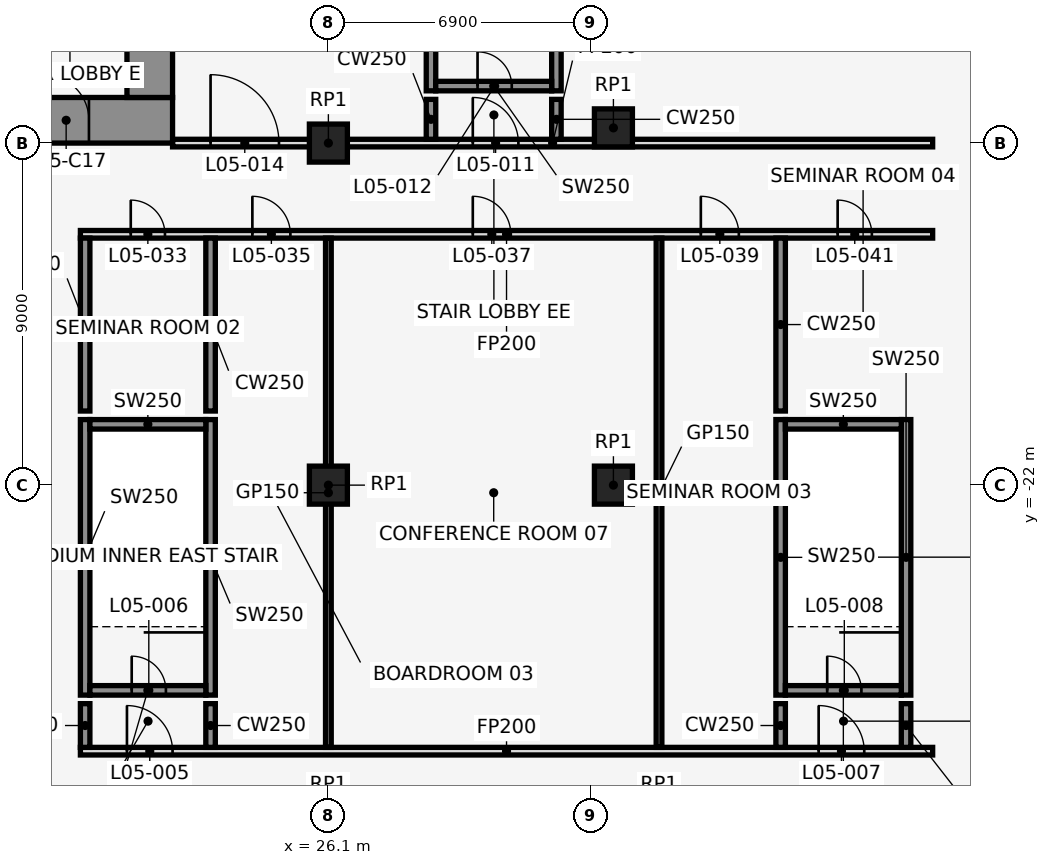
"""IFC4 building model, lengths in metres.
Left out: names, types, materials, properties, quantities, classifications, styles, units other than length and angle.
Written with IfcOpenShell. Run it as: python <this file> out.ifc"""

import sys

from ifc_helpers import new_model, si_unit, direction, frame, frame_2d, origin, origin_2d, place, context, subcontext, project, spatial, rectangle, extrude, element, fill, save


model = new_model("IFC4")
c1 = context("Model", 3, precision=1e-05, world=origin(), true_north=direction((0.0, 1.0)))
c2 = subcontext(c1, "Body", "Model", "MODEL_VIEW")
j1 = project(units=[si_unit("LENGTHUNIT", "METRE"), si_unit("PLANEANGLEUNIT", "RADIAN")], contexts=[c1])
p1 = place(None, origin())
s1 = spatial("IfcSite", under=j1, at=p1, CompositionType="ELEMENT")
p2 = place(p1, origin())
s2 = spatial("IfcBuilding", under=s1, at=p2, CompositionType="ELEMENT")
p3 = place(p2, frame((0.0, 0.0, 30.0)))
s3 = spatial("IfcBuildingStorey", under=s2, at=p3, CompositionType="ELEMENT", Elevation=30.0)
for number, where, z_axis, x_axis in (
    (1, (33.6, -12.6, 0.0), (0.0, 0.0, 1.0), (1.0, 0.0, 0.0)),
    (2, (33.6, -22.0, 0.0), (0.0, 0.0, 1.0), (1.0, 0.0, 0.0)),
    (3, (26.1, -22.0, 0.0), (0.0, 0.0, 1.0), (1.0, 0.0, 0.0)),
    (4, (26.1, -13.0, 0.0), (0.0, 0.0, 1.0), (1.0, 0.0, 0.0)),
):
    element("IfcColumn", number, at=place(p3, frame(where, z_axis=z_axis, x_axis=x_axis)), inside=s3, PredefinedType="COLUMN", context=c2, shape_type="SweptSolid", body=[
        extrude(rectangle(XDim=1.0, YDim=1.0, at=origin_2d()), origin(), (0.0, 0.0, 1.0), 5.0),
    ])
for number, where, z_axis, x_axis in (
    (5, (28.8, -11.625, 0.0), (0.0, 0.0, 1.0), (0.0, 1.0, 0.0)),
    (6, (32.1, -11.625, 0.0), (0.0, 0.0, 1.0), (0.0, 1.0, 0.0)),
):
    element("IfcWall", number, at=place(p3, frame(where, z_axis=z_axis, x_axis=x_axis)), inside=s3, PredefinedType="SHEAR", context=c2, shape_type="SweptSolid", body=[
        extrude(rectangle(XDim=7.25, YDim=0.25, at=frame_2d((3.625, 0.0))), origin(), (0.0, 0.0, 1.0), 5.0),
    ])
p4 = place(p3, frame((28.925, -11.5, 0.0), z_axis=(0.0, 0.0, 1.0), x_axis=(1.0, 0.0, 0.0)))
e7 = element("IfcWall", 7, at=p4, inside=s3, PredefinedType="SHEAR", context=c2, shape_type="SweptSolid", body=[
    extrude(rectangle(XDim=3.05, YDim=0.25, at=frame_2d((1.525, 0.0))), origin(), (0.0, 0.0, 1.0), 5.0),
])
p5 = place(p4, frame((1.1, 0.0, 0.0)))
e8 = element("IfcOpeningElement", 8, at=p5, cuts=e7, PredefinedType="OPENING", context=c2, shape_type="SweptSolid", body=[
    extrude(rectangle(XDim=0.9, YDim=2.1, at=frame_2d((0.45, 1.05))), frame((0.0, 0.137, 0.0), z_axis=(0.0, -1.0, 0.0), x_axis=(1.0, 0.0, 0.0)), (0.0, 0.0, 1.0), 0.274),
])
for number, where, z_axis, x_axis in (
    (9, (19.7, -27.525, 0.0), (0.0, 0.0, 1.0), (0.0, 1.0, 0.0)),
    (10, (23.0, -27.525, 0.0), (0.0, 0.0, 1.0), (0.0, 1.0, 0.0)),
):
    element("IfcWall", number, at=place(p3, frame(where, z_axis=z_axis, x_axis=x_axis)), inside=s3, PredefinedType="SHEAR", context=c2, shape_type="SweptSolid", body=[
        extrude(rectangle(XDim=7.25, YDim=0.25, at=frame_2d((3.625, 0.0))), origin(), (0.0, 0.0, 1.0), 5.0),
    ])
p6 = place(p3, frame((19.825, -27.4, 0.0), z_axis=(0.0, 0.0, 1.0), x_axis=(1.0, 0.0, 0.0)))
e11 = element("IfcWall", 11, at=p6, inside=s3, PredefinedType="SHEAR", context=c2, shape_type="SweptSolid", body=[
    extrude(rectangle(XDim=3.05, YDim=0.25, at=frame_2d((1.525, 0.0))), origin(), (0.0, 0.0, 1.0), 5.0),
])
p7 = place(p6, frame((1.1, 0.0, 0.0)))
e12 = element("IfcOpeningElement", 12, at=p7, cuts=e11, PredefinedType="OPENING", context=c2, shape_type="SweptSolid", body=[
    extrude(rectangle(XDim=0.9, YDim=2.1, at=frame_2d((0.45, 1.05))), frame((0.0, 0.137, 0.0), z_axis=(0.0, -1.0, 0.0), x_axis=(1.0, 0.0, 0.0)), (0.0, 0.0, 1.0), 0.274),
])
p8 = place(p3, frame((19.825, -20.4, 0.0), z_axis=(0.0, 0.0, 1.0), x_axis=(1.0, 0.0, 0.0)))
e13 = element("IfcWall", 13, at=p8, inside=s3, PredefinedType="SHEAR", context=c2, shape_type="SweptSolid", body=[
    extrude(rectangle(XDim=3.05, YDim=0.25, at=frame_2d((1.525, 0.0))), origin(), (0.0, 0.0, 1.0), 5.0),
])
for number, where, z_axis, x_axis in (
    (14, (38.0, -27.525, 0.0), (0.0, 0.0, 1.0), (0.0, 1.0, 0.0)),
    (15, (41.3, -27.525, 0.0), (0.0, 0.0, 1.0), (0.0, 1.0, 0.0)),
):
    element("IfcWall", number, at=place(p3, frame(where, z_axis=z_axis, x_axis=x_axis)), inside=s3, PredefinedType="SHEAR", context=c2, shape_type="SweptSolid", body=[
        extrude(rectangle(XDim=7.25, YDim=0.25, at=frame_2d((3.625, 0.0))), origin(), (0.0, 0.0, 1.0), 5.0),
    ])
p9 = place(p3, frame((38.125, -27.4, 0.0), z_axis=(0.0, 0.0, 1.0), x_axis=(1.0, 0.0, 0.0)))
e16 = element("IfcWall", 16, at=p9, inside=s3, PredefinedType="SHEAR", context=c2, shape_type="SweptSolid", body=[
    extrude(rectangle(XDim=3.05, YDim=0.25, at=frame_2d((1.525, 0.0))), origin(), (0.0, 0.0, 1.0), 5.0),
])
p10 = place(p9, frame((1.1, 0.0, 0.0)))
e17 = element("IfcOpeningElement", 17, at=p10, cuts=e16, PredefinedType="OPENING", context=c2, shape_type="SweptSolid", body=[
    extrude(rectangle(XDim=0.9, YDim=2.1, at=frame_2d((0.45, 1.05))), frame((0.0, 0.137, 0.0), z_axis=(0.0, -1.0, 0.0), x_axis=(1.0, 0.0, 0.0)), (0.0, 0.0, 1.0), 0.274),
])
p11 = place(p3, frame((38.125, -20.4, 0.0), z_axis=(0.0, 0.0, 1.0), x_axis=(1.0, 0.0, 0.0)))
e18 = element("IfcWall", 18, at=p11, inside=s3, PredefinedType="SHEAR", context=c2, shape_type="SweptSolid", body=[
    extrude(rectangle(XDim=3.05, YDim=0.25, at=frame_2d((1.525, 0.0))), origin(), (0.0, 0.0, 1.0), 5.0),
])
p12 = place(p3, frame((19.575, -29.0, 0.0), z_axis=(0.0, 0.0, 1.0), x_axis=(1.0, 0.0, 0.0)))
e19 = element("IfcWall", 19, at=p12, inside=s3, PredefinedType="PARTITIONING", context=c2, shape_type="SweptSolid", body=[
    extrude(rectangle(XDim=22.425, YDim=0.2, at=frame_2d((11.212, 0.0))), origin(), (0.0, 0.0, 1.0), 3.74),
])
p13 = place(p12, frame((1.225, 0.0, 0.0)))
e20 = element("IfcOpeningElement", 20, at=p13, cuts=e19, PredefinedType="OPENING", context=c2, shape_type="SweptSolid", body=[
    extrude(rectangle(XDim=1.2, YDim=2.1, at=frame_2d((0.6, 1.05))), frame((0.0, 0.112, 0.0), z_axis=(0.0, -1.0, 0.0), x_axis=(1.0, 0.0, 0.0)), (0.0, 0.0, 1.0), 0.224),
])
p14 = place(p12, frame((19.425, 0.0, 0.0)))
e21 = element("IfcOpeningElement", 21, at=p14, cuts=e19, PredefinedType="OPENING", context=c2, shape_type="SweptSolid", body=[
    extrude(rectangle(XDim=1.2, YDim=2.1, at=frame_2d((0.6, 1.05))), frame((0.0, 0.112, 0.0), z_axis=(0.0, -1.0, 0.0), x_axis=(1.0, 0.0, 0.0)), (0.0, 0.0, 1.0), 0.224),
])
p15 = place(p3, frame((19.575, -15.4, 0.0), z_axis=(0.0, 0.0, 1.0), x_axis=(1.0, 0.0, 0.0)))
e22 = element("IfcWall", 22, at=p15, inside=s3, PredefinedType="PARTITIONING", context=c2, shape_type="SweptSolid", body=[
    extrude(rectangle(XDim=22.425, YDim=0.2, at=frame_2d((11.212, 0.0))), origin(), (0.0, 0.0, 1.0), 3.74),
])
p16 = place(p15, frame((1.325, 0.0, 0.0)))
e23 = element("IfcOpeningElement", 23, at=p16, cuts=e22, PredefinedType="OPENING", context=c2, shape_type="SweptSolid", body=[
    extrude(rectangle(XDim=0.9, YDim=2.1, at=frame_2d((0.45, 1.05))), frame((0.0, 0.112, 0.0), z_axis=(0.0, -1.0, 0.0), x_axis=(1.0, 0.0, 0.0)), (0.0, 0.0, 1.0), 0.224),
])
p17 = place(p15, frame((4.525, 0.0, 0.0)))
e24 = element("IfcOpeningElement", 24, at=p17, cuts=e22, PredefinedType="OPENING", context=c2, shape_type="SweptSolid", body=[
    extrude(rectangle(XDim=1.0, YDim=2.1, at=frame_2d((0.5, 1.05))), frame((0.0, 0.112, 0.0), z_axis=(0.0, -1.0, 0.0), x_axis=(1.0, 0.0, 0.0)), (0.0, 0.0, 1.0), 0.224),
])
p18 = place(p15, frame((10.325, 0.0, 0.0)))
e25 = element("IfcOpeningElement", 25, at=p18, cuts=e22, PredefinedType="OPENING", context=c2, shape_type="SweptSolid", body=[
    extrude(rectangle(XDim=1.0, YDim=2.1, at=frame_2d((0.5, 1.05))), frame((0.0, 0.112, 0.0), z_axis=(0.0, -1.0, 0.0), x_axis=(1.0, 0.0, 0.0)), (0.0, 0.0, 1.0), 0.224),
])
p19 = place(p15, frame((16.325, 0.0, 0.0)))
e26 = element("IfcOpeningElement", 26, at=p19, cuts=e22, PredefinedType="OPENING", context=c2, shape_type="SweptSolid", body=[
    extrude(rectangle(XDim=1.0, YDim=2.1, at=frame_2d((0.5, 1.05))), frame((0.0, 0.112, 0.0), z_axis=(0.0, -1.0, 0.0), x_axis=(1.0, 0.0, 0.0)), (0.0, 0.0, 1.0), 0.224),
])
p20 = place(p15, frame((19.925, 0.0, 0.0)))
e27 = element("IfcOpeningElement", 27, at=p20, cuts=e22, PredefinedType="OPENING", context=c2, shape_type="SweptSolid", body=[
    extrude(rectangle(XDim=0.9, YDim=2.1, at=frame_2d((0.45, 1.05))), frame((0.0, 0.112, 0.0), z_axis=(0.0, -1.0, 0.0), x_axis=(1.0, 0.0, 0.0)), (0.0, 0.0, 1.0), 0.224),
])
p21 = place(p3, frame((22.0, -13.0, 0.0), z_axis=(0.0, 0.0, 1.0), x_axis=(1.0, 0.0, 0.0)))
e28 = element("IfcWall", 28, at=p21, inside=s3, PredefinedType="PARTITIONING", context=c2, shape_type="SweptSolid", body=[
    extrude(rectangle(XDim=20.0, YDim=0.2, at=frame_2d((10.0, 0.0))), origin(), (0.0, 0.0, 1.0), 3.74),
])
p22 = place(p21, frame((7.9, 0.0, 0.0)))
e29 = element("IfcOpeningElement", 29, at=p22, cuts=e28, PredefinedType="OPENING", context=c2, shape_type="SweptSolid", body=[
    extrude(rectangle(XDim=1.2, YDim=2.1, at=frame_2d((0.6, 1.05))), frame((0.0, 0.112, 0.0), z_axis=(0.0, -1.0, 0.0), x_axis=(1.0, 0.0, 0.0)), (0.0, 0.0, 1.0), 0.224),
])
p23 = place(p21, frame((1.0, 0.0, 0.0)))
e30 = element("IfcOpeningElement", 30, at=p23, cuts=e28, PredefinedType="OPENING", context=c2, shape_type="SweptSolid", body=[
    extrude(rectangle(XDim=1.8, YDim=2.1, at=frame_2d((0.9, 1.05))), frame((0.0, 0.112, 0.0), z_axis=(0.0, -1.0, 0.0), x_axis=(1.0, 0.0, 0.0)), (0.0, 0.0, 1.0), 0.224),
])
p24 = place(p3, frame((19.7, -28.9, 0.0), z_axis=(0.0, 0.0, 1.0), x_axis=(0.0, 1.0, 0.0)))
e31 = element("IfcWall", 31, at=p24, inside=s3, PredefinedType="SHEAR", context=c2, shape_type="SweptSolid", body=[
    extrude(rectangle(XDim=1.15, YDim=0.25, at=frame_2d((0.575, 0.0))), origin(), (0.0, 0.0, 1.0), 5.0),
])
p25 = place(p3, frame((19.7, -20.05, 0.0), z_axis=(0.0, 0.0, 1.0), x_axis=(0.0, 1.0, 0.0)))
e32 = element("IfcWall", 32, at=p25, inside=s3, PredefinedType="SHEAR", context=c2, shape_type="SweptSolid", body=[
    extrude(rectangle(XDim=4.55, YDim=0.25, at=frame_2d((2.275, 0.0))), origin(), (0.0, 0.0, 1.0), 5.0),
])
p26 = place(p3, frame((23.0, -28.9, 0.0), z_axis=(0.0, 0.0, 1.0), x_axis=(0.0, 1.0, 0.0)))
e33 = element("IfcWall", 33, at=p26, inside=s3, PredefinedType="SHEAR", context=c2, shape_type="SweptSolid", body=[
    extrude(rectangle(XDim=1.15, YDim=0.25, at=frame_2d((0.575, 0.0))), origin(), (0.0, 0.0, 1.0), 5.0),
])
p27 = place(p3, frame((23.0, -20.05, 0.0), z_axis=(0.0, 0.0, 1.0), x_axis=(0.0, 1.0, 0.0)))
e34 = element("IfcWall", 34, at=p27, inside=s3, PredefinedType="SHEAR", context=c2, shape_type="SweptSolid", body=[
    extrude(rectangle(XDim=4.55, YDim=0.25, at=frame_2d((2.275, 0.0))), origin(), (0.0, 0.0, 1.0), 5.0),
])
p28 = place(p3, frame((26.1, -28.9, 0.0), z_axis=(0.0, 0.0, 1.0), x_axis=(0.0, 1.0, 0.0)))
e35 = element("IfcWall", 35, at=p28, inside=s3, PredefinedType="PARTITIONING", context=c2, shape_type="SweptSolid", body=[
    extrude(rectangle(XDim=13.4, YDim=0.15, at=frame_2d((6.7, 0.0))), origin(), (0.0, 0.0, 1.0), 3.74),
])
for number, where, z_axis, x_axis in (
    (36, (28.8, -12.9, 0.0), (0.0, 0.0, 1.0), (0.0, 1.0, 0.0)),
    (37, (32.1, -12.9, 0.0), (0.0, 0.0, 1.0), (0.0, 1.0, 0.0)),
):
    element("IfcWall", number, at=place(p3, frame(where, z_axis=z_axis, x_axis=x_axis)), inside=s3, PredefinedType="SHEAR", context=c2, shape_type="SweptSolid", body=[
        extrude(rectangle(XDim=1.05, YDim=0.25, at=frame_2d((0.525, 0.0))), origin(), (0.0, 0.0, 1.0), 5.0),
    ])
p29 = place(p3, frame((34.8, -28.9, 0.0), z_axis=(0.0, 0.0, 1.0), x_axis=(0.0, 1.0, 0.0)))
e38 = element("IfcWall", 38, at=p29, inside=s3, PredefinedType="PARTITIONING", context=c2, shape_type="SweptSolid", body=[
    extrude(rectangle(XDim=13.4, YDim=0.15, at=frame_2d((6.7, 0.0))), origin(), (0.0, 0.0, 1.0), 3.74),
])
p30 = place(p3, frame((38.0, -28.9, 0.0), z_axis=(0.0, 0.0, 1.0), x_axis=(0.0, 1.0, 0.0)))
e39 = element("IfcWall", 39, at=p30, inside=s3, PredefinedType="SHEAR", context=c2, shape_type="SweptSolid", body=[
    extrude(rectangle(XDim=1.15, YDim=0.25, at=frame_2d((0.575, 0.0))), origin(), (0.0, 0.0, 1.0), 5.0),
])
p31 = place(p3, frame((38.0, -20.05, 0.0), z_axis=(0.0, 0.0, 1.0), x_axis=(0.0, 1.0, 0.0)))
e40 = element("IfcWall", 40, at=p31, inside=s3, PredefinedType="SHEAR", context=c2, shape_type="SweptSolid", body=[
    extrude(rectangle(XDim=4.55, YDim=0.25, at=frame_2d((2.275, 0.0))), origin(), (0.0, 0.0, 1.0), 5.0),
])
p32 = place(p3, frame((41.3, -28.9, 0.0), z_axis=(0.0, 0.0, 1.0), x_axis=(0.0, 1.0, 0.0)))
e41 = element("IfcWall", 41, at=p32, inside=s3, PredefinedType="SHEAR", context=c2, shape_type="SweptSolid", body=[
    extrude(rectangle(XDim=1.15, YDim=0.25, at=frame_2d((0.575, 0.0))), origin(), (0.0, 0.0, 1.0), 5.0),
])
p33 = place(p3, frame((-22.0, -12.4, 0.0), z_axis=(0.0, 0.0, 1.0), x_axis=(1.0, 0.0, 0.0)))
e42 = element("IfcWall", 42, at=p33, inside=s3, PredefinedType="SHEAR", context=c2, shape_type="SweptSolid", body=[
    extrude(rectangle(XDim=44.0, YDim=1.2, at=frame_2d((22.0, 0.0))), origin(), (0.0, 0.0, 1.0), 5.0),
])
p34 = place(p33, frame((2.2, 0.0, 0.0)))
e43 = element("IfcOpeningElement", 43, at=p34, cuts=e42, PredefinedType="OPENING", context=c2, shape_type="SweptSolid", body=[
    extrude(rectangle(XDim=1.2, YDim=2.1, at=frame_2d((0.6, 1.05))), frame((0.0, 0.612, 0.0), z_axis=(0.0, -1.0, 0.0), x_axis=(1.0, 0.0, 0.0)), (0.0, 0.0, 1.0), 1.224),
])
p35 = place(p33, frame((21.4, 0.0, 0.0)))
e44 = element("IfcOpeningElement", 44, at=p35, cuts=e42, PredefinedType="OPENING", context=c2, shape_type="SweptSolid", body=[
    extrude(rectangle(XDim=1.2, YDim=2.1, at=frame_2d((0.6, 1.05))), frame((0.0, 0.612, 0.0), z_axis=(0.0, -1.0, 0.0), x_axis=(1.0, 0.0, 0.0)), (0.0, 0.0, 1.0), 1.224),
])
p36 = place(p33, frame((40.6, 0.0, 0.0)))
e45 = element("IfcOpeningElement", 45, at=p36, cuts=e42, PredefinedType="OPENING", context=c2, shape_type="SweptSolid", body=[
    extrude(rectangle(XDim=1.2, YDim=2.1, at=frame_2d((0.6, 1.05))), frame((0.0, 0.612, 0.0), z_axis=(0.0, -1.0, 0.0), x_axis=(1.0, 0.0, 0.0)), (0.0, 0.0, 1.0), 1.224),
])
p37 = place(p33, frame((16.0, 0.0, 0.0)))
e46 = element("IfcOpeningElement", 46, at=p37, cuts=e42, PredefinedType="OPENING", context=c2, shape_type="SweptSolid", body=[
    extrude(rectangle(XDim=1.8, YDim=2.1, at=frame_2d((0.9, 1.05))), frame((0.0, 0.612, 0.0), z_axis=(0.0, -1.0, 0.0), x_axis=(1.0, 0.0, 0.0)), (0.0, 0.0, 1.0), 1.224),
])
p38 = place(p33, frame((6.3, 0.0, 0.0)))
e47 = element("IfcOpeningElement", 47, at=p38, cuts=e42, PredefinedType="OPENING", context=c2, shape_type="SweptSolid", body=[
    extrude(rectangle(XDim=1.2, YDim=2.1, at=frame_2d((0.6, 1.05))), frame((0.0, 0.612, 0.0), z_axis=(0.0, -1.0, 0.0), x_axis=(1.0, 0.0, 0.0)), (0.0, 0.0, 1.0), 1.224),
])
p39 = place(p33, frame((26.2, 0.0, 0.0)))
e48 = element("IfcOpeningElement", 48, at=p39, cuts=e42, PredefinedType="OPENING", context=c2, shape_type="SweptSolid", body=[
    extrude(rectangle(XDim=1.8, YDim=2.1, at=frame_2d((0.9, 1.05))), frame((0.0, 0.612, 0.0), z_axis=(0.0, -1.0, 0.0), x_axis=(1.0, 0.0, 0.0)), (0.0, 0.0, 1.0), 1.224),
])
p40 = place(p33, frame((36.5, 0.0, 0.0)))
e49 = element("IfcOpeningElement", 49, at=p40, cuts=e42, PredefinedType="OPENING", context=c2, shape_type="SweptSolid", body=[
    extrude(rectangle(XDim=1.2, YDim=2.1, at=frame_2d((0.6, 1.05))), frame((0.0, 0.612, 0.0), z_axis=(0.0, -1.0, 0.0), x_axis=(1.0, 0.0, 0.0)), (0.0, 0.0, 1.0), 1.224),
])
p41 = place(p3, frame((21.4, -11.8, 0.0), z_axis=(0.0, 0.0, 1.0), x_axis=(0.0, 1.0, 0.0)))
e50 = element("IfcWall", 50, at=p41, inside=s3, PredefinedType="SHEAR", context=c2, shape_type="SweptSolid", body=[
    extrude(rectangle(XDim=10.6, YDim=1.2, at=frame_2d((5.3, 0.0))), origin(), (0.0, 0.0, 1.0), 5.0),
])
p42 = place(p13, origin())
e51 = element("IfcDoor", 51, at=p42, inside=s3, OperationType="SINGLE_SWING_LEFT", PredefinedType="DOOR", context=c2, shape_type="SweptSolid", body=[
    extrude(rectangle(XDim=1.2, YDim=2.1, at=frame_2d((0.6, 1.05))), frame((0.0, 0.025, 0.0), z_axis=(0.0, -1.0, 0.0), x_axis=(1.0, 0.0, 0.0)), (0.0, 0.0, 1.0), 0.05),
])
fill(e20, e51)
p43 = place(p7, origin())
e52 = element("IfcDoor", 52, at=p43, inside=s3, OperationType="SINGLE_SWING_RIGHT", PredefinedType="DOOR", context=c2, shape_type="SweptSolid", body=[
    extrude(rectangle(XDim=0.9, YDim=2.1, at=frame_2d((0.45, 1.05))), frame((0.0, 0.025, 0.0), z_axis=(0.0, -1.0, 0.0), x_axis=(1.0, 0.0, 0.0)), (0.0, 0.0, 1.0), 0.05),
])
fill(e12, e52)
p44 = place(p14, origin())
e53 = element("IfcDoor", 53, at=p44, inside=s3, OperationType="SINGLE_SWING_LEFT", PredefinedType="DOOR", context=c2, shape_type="SweptSolid", body=[
    extrude(rectangle(XDim=1.2, YDim=2.1, at=frame_2d((0.6, 1.05))), frame((0.0, 0.025, 0.0), z_axis=(0.0, -1.0, 0.0), x_axis=(1.0, 0.0, 0.0)), (0.0, 0.0, 1.0), 0.05),
])
fill(e21, e53)
p45 = place(p10, origin())
e54 = element("IfcDoor", 54, at=p45, inside=s3, OperationType="SINGLE_SWING_LEFT", PredefinedType="DOOR", context=c2, shape_type="SweptSolid", body=[
    extrude(rectangle(XDim=0.9, YDim=2.1, at=frame_2d((0.45, 1.05))), frame((0.0, 0.025, 0.0), z_axis=(0.0, -1.0, 0.0), x_axis=(1.0, 0.0, 0.0)), (0.0, 0.0, 1.0), 0.05),
])
fill(e17, e54)
p46 = place(p22, origin())
e55 = element("IfcDoor", 55, at=p46, inside=s3, OperationType="SINGLE_SWING_LEFT", PredefinedType="DOOR", context=c2, shape_type="SweptSolid", body=[
    extrude(rectangle(XDim=1.2, YDim=2.1, at=frame_2d((0.6, 1.05))), frame((0.0, 0.025, 0.0), z_axis=(0.0, -1.0, 0.0), x_axis=(1.0, 0.0, 0.0)), (0.0, 0.0, 1.0), 0.05),
])
fill(e29, e55)
p47 = place(p5, origin())
e56 = element("IfcDoor", 56, at=p47, inside=s3, OperationType="SINGLE_SWING_RIGHT", PredefinedType="DOOR", context=c2, shape_type="SweptSolid", body=[
    extrude(rectangle(XDim=0.9, YDim=2.1, at=frame_2d((0.45, 1.05))), frame((0.0, 0.025, 0.0), z_axis=(0.0, -1.0, 0.0), x_axis=(1.0, 0.0, 0.0)), (0.0, 0.0, 1.0), 0.05),
])
fill(e8, e56)
p48 = place(p23, origin())
e57 = element("IfcDoor", 57, at=p48, inside=s3, OperationType="SINGLE_SWING_LEFT", PredefinedType="DOOR", context=c2, shape_type="SweptSolid", body=[
    extrude(rectangle(XDim=1.8, YDim=2.1, at=frame_2d((0.9, 1.05))), frame((0.0, 0.025, 0.0), z_axis=(0.0, -1.0, 0.0), x_axis=(1.0, 0.0, 0.0)), (0.0, 0.0, 1.0), 0.05),
])
fill(e30, e57)
p49 = place(p16, frame((0.9, 0.0, 0.0), z_axis=(0.0, 0.0, 1.0), x_axis=(-1.0, 0.0, 0.0)))
e58 = element("IfcDoor", 58, at=p49, inside=s3, OperationType="SINGLE_SWING_RIGHT", PredefinedType="DOOR", context=c2, shape_type="SweptSolid", body=[
    extrude(rectangle(XDim=0.9, YDim=2.1, at=frame_2d((0.45, 1.05))), frame((0.0, 0.025, 0.0), z_axis=(0.0, -1.0, 0.0), x_axis=(1.0, 0.0, 0.0)), (0.0, 0.0, 1.0), 0.05),
])
fill(e23, e58)
p50 = place(p17, frame((1.0, 0.0, 0.0), z_axis=(0.0, 0.0, 1.0), x_axis=(-1.0, 0.0, 0.0)))
e59 = element("IfcDoor", 59, at=p50, inside=s3, OperationType="SINGLE_SWING_RIGHT", PredefinedType="DOOR", context=c2, shape_type="SweptSolid", body=[
    extrude(rectangle(XDim=1.0, YDim=2.1, at=frame_2d((0.5, 1.05))), frame((0.0, 0.025, 0.0), z_axis=(0.0, -1.0, 0.0), x_axis=(1.0, 0.0, 0.0)), (0.0, 0.0, 1.0), 0.05),
])
fill(e24, e59)
p51 = place(p18, frame((1.0, 0.0, 0.0), z_axis=(0.0, 0.0, 1.0), x_axis=(-1.0, 0.0, 0.0)))
e60 = element("IfcDoor", 60, at=p51, inside=s3, OperationType="SINGLE_SWING_LEFT", PredefinedType="DOOR", context=c2, shape_type="SweptSolid", body=[
    extrude(rectangle(XDim=1.0, YDim=2.1, at=frame_2d((0.5, 1.05))), frame((0.0, 0.025, 0.0), z_axis=(0.0, -1.0, 0.0), x_axis=(1.0, 0.0, 0.0)), (0.0, 0.0, 1.0), 0.05),
])
fill(e25, e60)
p52 = place(p19, frame((1.0, 0.0, 0.0), z_axis=(0.0, 0.0, 1.0), x_axis=(-1.0, 0.0, 0.0)))
e61 = element("IfcDoor", 61, at=p52, inside=s3, OperationType="SINGLE_SWING_RIGHT", PredefinedType="DOOR", context=c2, shape_type="SweptSolid", body=[
    extrude(rectangle(XDim=1.0, YDim=2.1, at=frame_2d((0.5, 1.05))), frame((0.0, 0.025, 0.0), z_axis=(0.0, -1.0, 0.0), x_axis=(1.0, 0.0, 0.0)), (0.0, 0.0, 1.0), 0.05),
])
fill(e26, e61)
p53 = place(p20, frame((0.9, 0.0, 0.0), z_axis=(0.0, 0.0, 1.0), x_axis=(-1.0, 0.0, 0.0)))
e62 = element("IfcDoor", 62, at=p53, inside=s3, OperationType="SINGLE_SWING_RIGHT", PredefinedType="DOOR", context=c2, shape_type="SweptSolid", body=[
    extrude(rectangle(XDim=0.9, YDim=2.1, at=frame_2d((0.45, 1.05))), frame((0.0, 0.025, 0.0), z_axis=(0.0, -1.0, 0.0), x_axis=(1.0, 0.0, 0.0)), (0.0, 0.0, 1.0), 0.05),
])
fill(e27, e62)
p54 = place(p36, frame((1.2, 0.0, 0.0), z_axis=(0.0, 0.0, 1.0), x_axis=(-1.0, 0.0, 0.0)))
e63 = element("IfcDoor", 63, at=p54, inside=s3, OperationType="SINGLE_SWING_RIGHT", PredefinedType="DOOR", context=c2, shape_type="SweptSolid", body=[
    extrude(rectangle(XDim=1.2, YDim=2.1, at=frame_2d((0.6, 1.05))), frame((0.0, 0.025, 0.0), z_axis=(0.0, -1.0, 0.0), x_axis=(1.0, 0.0, 0.0)), (0.0, 0.0, 1.0), 0.05),
])
fill(e45, e63)
save(model, sys.argv[1])
